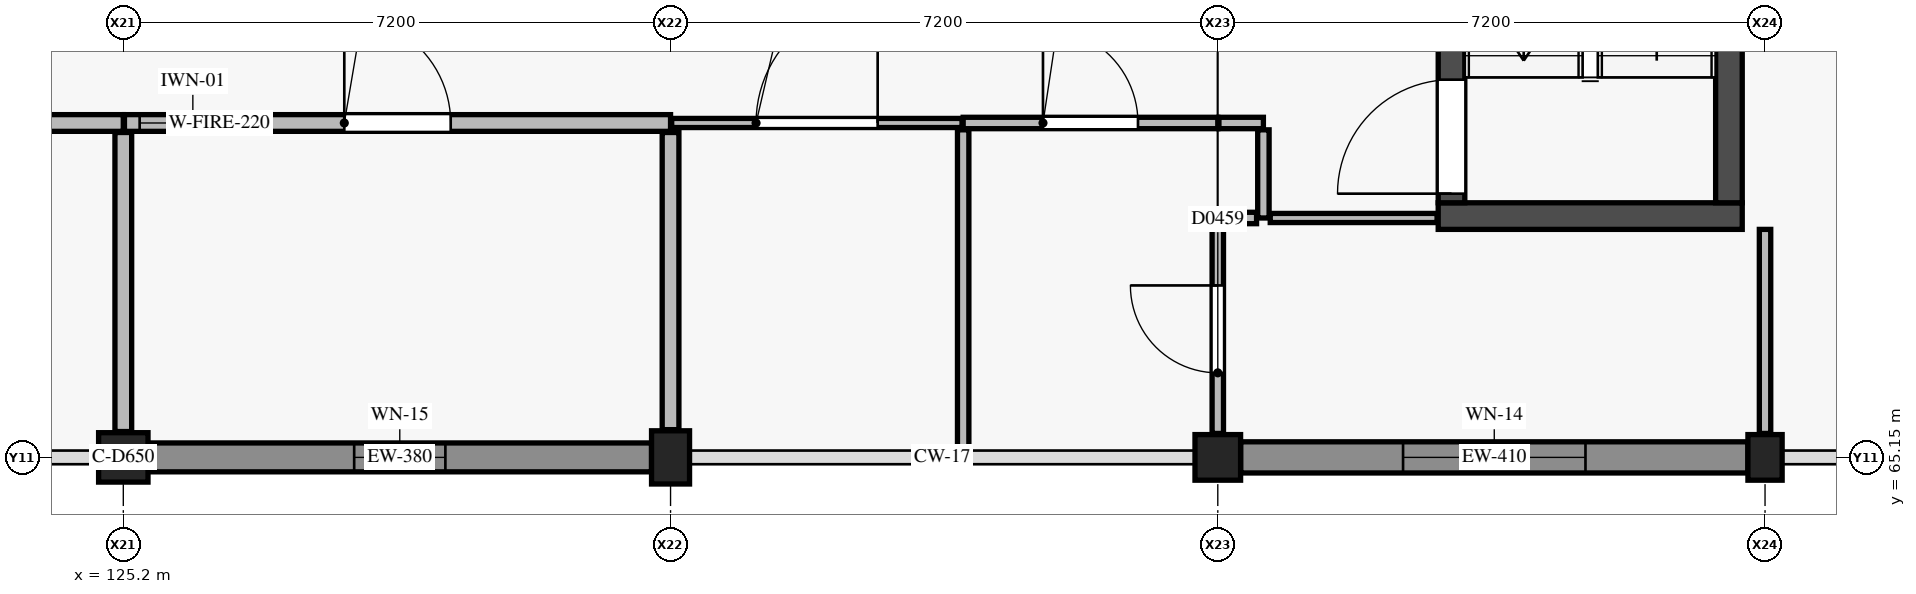
"""IFC4 building model, lengths in metres.
Left out: names, types, materials, properties, quantities, classifications, styles, units other than length and angle.
Written with IfcOpenShell. Run it as: python <this file> out.ifc"""

import sys

from ifc_helpers import new_model, si_unit, direction, frame, frame_2d, origin, origin_2d, place, context, subcontext, project, spatial, rectangle, circle, extrude, element, fill, save


model = new_model("IFC4")
c1 = context("Model", 3, precision=1e-05, world=origin(), true_north=direction((0.0, 1.0)))
c2 = subcontext(c1, "Body", "Model", "MODEL_VIEW")
j1 = project(units=[si_unit("LENGTHUNIT", "METRE"), si_unit("PLANEANGLEUNIT", "RADIAN")], contexts=[c1])
p1 = place(None, origin())
s1 = spatial("IfcSite", under=j1, at=p1, CompositionType="ELEMENT")
p2 = place(p1, origin())
s2 = spatial("IfcBuilding", under=s1, at=p2, CompositionType="ELEMENT")
p3 = place(p2, frame((0.0, 0.0, 9.0)))
s3 = spatial("IfcBuildingStorey", under=s2, at=p3, CompositionType="ELEMENT", Elevation=9.0)
p4 = place(p3, frame((125.2, 65.15, 0.0), z_axis=(0.0, 0.0, 1.0), x_axis=(1.0, 0.0, 0.0)))
e1 = element("IfcColumn", 1, at=p4, inside=s3, PredefinedType="COLUMN", context=c2, shape_type="SweptSolid", body=[
    extrude(circle(Radius=0.325, at=origin_2d()), origin(), (0.0, 0.0, 1.0), 4.2),
])
p5 = place(p3, frame((132.4, 65.15, 0.0), z_axis=(0.0, 0.0, 1.0), x_axis=(1.0, 0.0, 0.0)))
e2 = element("IfcColumn", 2, at=p5, inside=s3, PredefinedType="COLUMN", context=c2, shape_type="SweptSolid", body=[
    extrude(rectangle(XDim=0.5, YDim=0.7, at=origin_2d()), origin(), (0.0, 0.0, 1.0), 4.2),
])
p6 = place(p3, frame((139.6, 65.15, 0.0), z_axis=(0.0, 0.0, 1.0), x_axis=(1.0, 0.0, 0.0)))
e3 = element("IfcColumn", 3, at=p6, inside=s3, PredefinedType="COLUMN", context=c2, shape_type="SweptSolid", body=[
    extrude(rectangle(XDim=0.6, YDim=0.6, at=origin_2d()), origin(), (0.0, 0.0, 1.0), 4.2),
])
p7 = place(p3, frame((146.8, 65.15, 0.0), z_axis=(0.0, 0.0, 1.0), x_axis=(1.0, 0.0, 0.0)))
e4 = element("IfcColumn", 4, at=p7, inside=s3, PredefinedType="COLUMN", context=c2, shape_type="SweptSolid", body=[
    extrude(rectangle(XDim=0.45, YDim=0.6, at=origin_2d()), origin(), (0.0, 0.0, 1.0), 4.2),
])
p8 = place(p3, frame((142.5, 68.325, 0.0), z_axis=(0.0, 0.0, 1.0), x_axis=(1.0, 0.0, 0.0)))
e5 = element("IfcWall", 5, at=p8, inside=s3, PredefinedType="SHEAR", context=c2, shape_type="SweptSolid", body=[
    extrude(rectangle(XDim=4.0, YDim=0.35, at=frame_2d((2.0, 0.0))), origin(), (0.0, 0.0, 1.0), 3.95),
])
p9 = place(p3, frame((142.675, 68.5, 0.0), z_axis=(0.0, 0.0, 1.0), x_axis=(0.0, 1.0, 0.0)))
e6 = element("IfcWall", 6, at=p9, inside=s3, PredefinedType="SHEAR", context=c2, shape_type="SweptSolid", body=[
    extrude(rectangle(XDim=7.3, YDim=0.35, at=frame_2d((3.65, 0.0))), origin(), (0.0, 0.0, 1.0), 3.95),
])
p10 = place(p9, frame((0.12, 0.0, 0.0)))
e7 = element("IfcOpeningElement", 7, at=p10, cuts=e6, PredefinedType="OPENING", context=c2, shape_type="SweptSolid", body=[
    extrude(rectangle(XDim=1.5, YDim=2.15, at=frame_2d((0.75, 1.075))), frame((0.0, 0.185, 0.0), z_axis=(0.0, -1.0, 0.0), x_axis=(1.0, 0.0, 0.0)), (0.0, 0.0, 1.0), 0.37),
])
p11 = place(p3, frame((146.325, 68.5, 0.0), z_axis=(0.0, 0.0, 1.0), x_axis=(0.0, 1.0, 0.0)))
e8 = element("IfcWall", 8, at=p11, inside=s3, PredefinedType="SHEAR", context=c2, shape_type="SweptSolid", body=[
    extrude(rectangle(XDim=7.3, YDim=0.35, at=frame_2d((3.65, 0.0))), origin(), (0.0, 0.0, 1.0), 3.95),
])
p12 = place(p3, frame((146.575, 65.15, 0.0), z_axis=(0.0, 0.0, 1.0), x_axis=(-1.0, 0.0, 0.0)))
e9 = element("IfcWall", 9, at=p12, inside=s3, PredefinedType="USERDEFINED", context=c2, shape_type="SweptSolid", body=[
    extrude(rectangle(XDim=6.675, YDim=0.41, at=frame_2d((3.337, 0.0))), origin(), (0.0, 0.0, 1.0), 3.13),
])
p13 = place(p12, frame((2.137, 0.0, 0.9)))
e10 = element("IfcOpeningElement", 10, at=p13, cuts=e9, PredefinedType="OPENING", context=c2, shape_type="SweptSolid", body=[
    extrude(rectangle(XDim=2.4, YDim=1.5, at=frame_2d((1.2, 0.75))), frame((0.0, 0.215, 0.0), z_axis=(0.0, -1.0, 0.0), x_axis=(1.0, 0.0, 0.0)), (0.0, 0.0, 1.0), 0.43),
])
p14 = place(p3, frame((132.15, 65.15, 0.0), z_axis=(0.0, 0.0, 1.0), x_axis=(-1.0, 0.0, 0.0)))
e11 = element("IfcWall", 11, at=p14, inside=s3, PredefinedType="USERDEFINED", context=c2, shape_type="SweptSolid", body=[
    extrude(rectangle(XDim=6.625, YDim=0.38, at=frame_2d((3.312, 0.0))), origin(), (0.0, 0.0, 1.0), 3.13),
])
p15 = place(p14, frame((2.712, 0.0, 0.6)))
e12 = element("IfcOpeningElement", 12, at=p15, cuts=e11, PredefinedType="OPENING", context=c2, shape_type="SweptSolid", body=[
    extrude(rectangle(XDim=1.2, YDim=2.2, at=frame_2d((0.6, 1.1))), frame((0.0, 0.2, 0.0), z_axis=(0.0, -1.0, 0.0), x_axis=(1.0, 0.0, 0.0)), (0.0, 0.0, 1.0), 0.4),
])
p16 = place(p3, frame((120.525, 69.55, 0.0), z_axis=(0.0, 0.0, 1.0), x_axis=(1.0, 0.0, 0.0)))
e13 = element("IfcWall", 13, at=p16, inside=s3, PredefinedType="PARTITIONING", context=c2, shape_type="SweptSolid", body=[
    extrude(rectangle(XDim=4.675, YDim=0.22, at=frame_2d((2.337, 0.0))), origin(), (0.0, 0.0, 1.0), 3.285),
])
p17 = place(p3, frame((125.215, 69.55, 0.0), z_axis=(0.0, 0.0, 1.0), x_axis=(1.0, 0.0, 0.0)))
e14 = element("IfcWall", 14, at=p17, inside=s3, PredefinedType="PARTITIONING", context=c2, shape_type="SweptSolid", body=[
    extrude(rectangle(XDim=7.185, YDim=0.22, at=frame_2d((3.592, 0.0))), origin(), (0.0, 0.0, 1.0), 3.285),
])
p18 = place(p17, frame((2.893, 0.0, 0.0)))
e15 = element("IfcOpeningElement", 15, at=p18, cuts=e14, PredefinedType="OPENING", context=c2, shape_type="SweptSolid", body=[
    extrude(rectangle(XDim=1.4, YDim=2.2, at=frame_2d((0.7, 1.1))), frame((0.0, 0.12, 0.0), z_axis=(0.0, -1.0, 0.0), x_axis=(1.0, 0.0, 0.0)), (0.0, 0.0, 1.0), 0.24),
])
p19 = place(p17, frame((0.2, 0.0, 1.05)))
e16 = element("IfcOpeningElement", 16, at=p19, cuts=e14, PredefinedType="OPENING", context=c2, shape_type="SweptSolid", body=[
    extrude(rectangle(XDim=1.4, YDim=1.1, at=frame_2d((0.7, 0.55))), frame((0.0, 0.12, 0.0), z_axis=(0.0, -1.0, 0.0), x_axis=(1.0, 0.0, 0.0)), (0.0, 0.0, 1.0), 0.24),
])
p20 = place(p3, frame((136.25, 69.55, 0.0), z_axis=(0.0, 0.0, 1.0), x_axis=(1.0, 0.0, 0.0)))
e17 = element("IfcWall", 17, at=p20, inside=s3, PredefinedType="PARTITIONING", context=c2, shape_type="SweptSolid", body=[
    extrude(rectangle(XDim=3.35, YDim=0.15, at=frame_2d((1.675, 0.0))), origin(), (0.0, 0.0, 1.0), 3.285),
])
p21 = place(p20, frame((1.05, 0.0, 0.0)))
e18 = element("IfcOpeningElement", 18, at=p21, cuts=e17, PredefinedType="OPENING", context=c2, shape_type="SweptSolid", body=[
    extrude(rectangle(XDim=1.25, YDim=2.15, at=frame_2d((0.625, 1.075))), frame((0.0, 0.085, 0.0), z_axis=(0.0, -1.0, 0.0), x_axis=(1.0, 0.0, 0.0)), (0.0, 0.0, 1.0), 0.17),
])
p22 = place(p3, frame((139.615, 69.55, 0.0), z_axis=(0.0, 0.0, 1.0), x_axis=(1.0, 0.0, 0.0)))
e19 = element("IfcWall", 19, at=p22, inside=s3, PredefinedType="PARTITIONING", context=c2, shape_type="SweptSolid", body=[
    extrude(rectangle(XDim=0.585, YDim=0.15, at=frame_2d((0.292, 0.0))), origin(), (0.0, 0.0, 1.0), 3.285),
])
p23 = place(p3, frame((140.2, 68.3, 0.0), z_axis=(0.0, 0.0, 1.0), x_axis=(0.0, 1.0, 0.0)))
e20 = element("IfcWall", 20, at=p23, inside=s3, PredefinedType="PARTITIONING", context=c2, shape_type="SweptSolid", body=[
    extrude(rectangle(XDim=1.16, YDim=0.15, at=frame_2d((0.58, 0.0))), origin(), (0.0, 0.0, 1.0), 3.95),
])
p24 = place(p3, frame((139.6, 68.3, 0.0), z_axis=(0.0, 0.0, 1.0), x_axis=(1.0, 0.0, 0.0)))
e21 = element("IfcWall", 21, at=p24, inside=s3, PredefinedType="PARTITIONING", context=c2, shape_type="SweptSolid", body=[
    extrude(rectangle(XDim=0.51, YDim=0.15, at=frame_2d((0.255, 0.0))), origin(), (0.0, 0.0, 1.0), 3.285),
])
p25 = place(p3, frame((132.415, 69.55, 0.0), z_axis=(0.0, 0.0, 1.0), x_axis=(1.0, 0.0, 0.0)))
e22 = element("IfcWall", 22, at=p25, inside=s3, PredefinedType="PARTITIONING", context=c2, shape_type="SweptSolid", body=[
    extrude(rectangle(XDim=3.82, YDim=0.12, at=frame_2d((1.91, 0.0))), origin(), (0.0, 0.0, 1.0), 3.455),
])
p26 = place(p25, frame((1.11, 0.0, 0.0)))
e23 = element("IfcOpeningElement", 23, at=p26, cuts=e22, PredefinedType="OPENING", context=c2, shape_type="SweptSolid", body=[
    extrude(rectangle(XDim=1.6, YDim=2.25, at=frame_2d((0.8, 1.125))), frame((0.0, 0.07, 0.0), z_axis=(0.0, -1.0, 0.0), x_axis=(1.0, 0.0, 0.0)), (0.0, 0.0, 1.0), 0.14),
])
p27 = place(p3, frame((140.29, 68.3, 0.0), z_axis=(0.0, 0.0, 1.0), x_axis=(1.0, 0.0, 0.0)))
e24 = element("IfcWall", 24, at=p27, inside=s3, PredefinedType="PARTITIONING", context=c2, shape_type="SweptSolid", body=[
    extrude(rectangle(XDim=2.195, YDim=0.12, at=frame_2d((1.098, 0.0))), origin(), (0.0, 0.0, 1.0), 3.95),
])
p28 = place(p3, frame((125.2, 65.49, 0.0), z_axis=(0.0, 0.0, 1.0), x_axis=(0.0, 1.0, 0.0)))
e25 = element("IfcWall", 25, at=p28, inside=s3, PredefinedType="PARTITIONING", context=c2, shape_type="SweptSolid", body=[
    extrude(rectangle(XDim=3.935, YDim=0.22, at=frame_2d((1.968, 0.0))), origin(), (0.0, 0.0, 1.0), 3.285),
])
p29 = place(p3, frame((132.4, 65.515, 0.0), z_axis=(0.0, 0.0, 1.0), x_axis=(0.0, 1.0, 0.0)))
e26 = element("IfcWall", 26, at=p29, inside=s3, PredefinedType="PARTITIONING", context=c2, shape_type="SweptSolid", body=[
    extrude(rectangle(XDim=3.91, YDim=0.22, at=frame_2d((1.955, 0.0))), origin(), (0.0, 0.0, 1.0), 3.455),
])
p30 = place(p3, frame((136.25, 65.255, 0.0), z_axis=(0.0, 0.0, 1.0), x_axis=(0.0, 1.0, 0.0)))
e27 = element("IfcWall", 27, at=p30, inside=s3, PredefinedType="PARTITIONING", context=c2, shape_type="SweptSolid", body=[
    extrude(rectangle(XDim=4.205, YDim=0.15, at=frame_2d((2.103, 0.0))), origin(), (0.0, 0.0, 1.0), 3.475),
])
p31 = place(p3, frame((139.6, 65.465, 0.0), z_axis=(0.0, 0.0, 1.0), x_axis=(0.0, 1.0, 0.0)))
e28 = element("IfcWall", 28, at=p31, inside=s3, PredefinedType="PARTITIONING", context=c2, shape_type="SweptSolid", body=[
    extrude(rectangle(XDim=2.745, YDim=0.15, at=frame_2d((1.373, 0.0))), origin(), (0.0, 0.0, 1.0), 3.285),
])
p32 = place(p31, frame((0.798, 0.0, 0.0)))
e29 = element("IfcOpeningElement", 29, at=p32, cuts=e28, PredefinedType="OPENING", context=c2, shape_type="SweptSolid", body=[
    extrude(rectangle(XDim=1.15, YDim=2.15, at=frame_2d((0.575, 1.075))), frame((0.0, 0.085, 0.0), z_axis=(0.0, -1.0, 0.0), x_axis=(1.0, 0.0, 0.0)), (0.0, 0.0, 1.0), 0.17),
])
p33 = place(p3, frame((146.8, 65.465, 0.0), z_axis=(0.0, 0.0, 1.0), x_axis=(0.0, 1.0, 0.0)))
e30 = element("IfcWall", 30, at=p33, inside=s3, PredefinedType="PARTITIONING", context=c2, shape_type="SweptSolid", body=[
    extrude(rectangle(XDim=2.685, YDim=0.15, at=frame_2d((1.342, 0.0))), origin(), (0.0, 0.0, 1.0), 3.215),
])
p34 = place(p13, origin())
e31 = element("IfcWindow", 31, at=p34, inside=s3, PartitioningType="SINGLE_PANEL", PredefinedType="WINDOW", context=c2, shape_type="SweptSolid", body=[
    extrude(rectangle(XDim=2.4, YDim=1.5, at=frame_2d((1.2, 0.75))), frame((0.0, 0.03, 0.0), z_axis=(0.0, -1.0, 0.0), x_axis=(1.0, 0.0, 0.0)), (0.0, 0.0, 1.0), 0.06),
])
fill(e10, e31)
p35 = place(p15, origin())
e32 = element("IfcWindow", 32, at=p35, inside=s3, PartitioningType="SINGLE_PANEL", PredefinedType="WINDOW", context=c2, shape_type="SweptSolid", body=[
    extrude(rectangle(XDim=1.2, YDim=2.2, at=frame_2d((0.6, 1.1))), frame((0.0, 0.03, 0.0), z_axis=(0.0, -1.0, 0.0), x_axis=(1.0, 0.0, 0.0)), (0.0, 0.0, 1.0), 0.06),
])
fill(e12, e32)
p36 = place(p10, origin())
e33 = element("IfcDoor", 33, at=p36, inside=s3, OperationType="SINGLE_SWING_LEFT", PredefinedType="DOOR", context=c2, shape_type="SweptSolid", body=[
    extrude(rectangle(XDim=1.5, YDim=2.15, at=frame_2d((0.75, 1.075))), frame((0.0, 0.025, 0.0), z_axis=(0.0, -1.0, 0.0), x_axis=(1.0, 0.0, 0.0)), (0.0, 0.0, 1.0), 0.05),
])
fill(e7, e33)
p37 = place(p18, origin())
e34 = element("IfcDoor", 34, at=p37, inside=s3, OperationType="SINGLE_SWING_LEFT", PredefinedType="DOOR", context=c2, shape_type="SweptSolid", body=[
    extrude(rectangle(XDim=1.4, YDim=2.2, at=frame_2d((0.7, 1.1))), frame((0.0, 0.025, 0.0), z_axis=(0.0, -1.0, 0.0), x_axis=(1.0, 0.0, 0.0)), (0.0, 0.0, 1.0), 0.05),
])
fill(e15, e34)
p38 = place(p19, origin())
e35 = element("IfcWindow", 35, at=p38, inside=s3, PartitioningType="SINGLE_PANEL", PredefinedType="WINDOW", context=c2, shape_type="SweptSolid", body=[
    extrude(rectangle(XDim=1.4, YDim=1.1, at=frame_2d((0.7, 0.55))), frame((0.0, 0.03, 0.0), z_axis=(0.0, -1.0, 0.0), x_axis=(1.0, 0.0, 0.0)), (0.0, 0.0, 1.0), 0.06),
])
fill(e16, e35)
p39 = place(p26, origin())
e36 = element("IfcDoor", 36, at=p39, inside=s3, OperationType="SINGLE_SWING_RIGHT", PredefinedType="DOOR", context=c2, shape_type="SweptSolid", body=[
    extrude(rectangle(XDim=1.6, YDim=2.25, at=frame_2d((0.8, 1.125))), frame((0.0, 0.025, 0.0), z_axis=(0.0, -1.0, 0.0), x_axis=(1.0, 0.0, 0.0)), (0.0, 0.0, 1.0), 0.05),
])
fill(e23, e36)
p40 = place(p21, origin())
e37 = element("IfcDoor", 37, at=p40, inside=s3, OperationType="SINGLE_SWING_LEFT", PredefinedType="DOOR", context=c2, shape_type="SweptSolid", body=[
    extrude(rectangle(XDim=1.25, YDim=2.15, at=frame_2d((0.625, 1.075))), frame((0.0, 0.025, 0.0), z_axis=(0.0, -1.0, 0.0), x_axis=(1.0, 0.0, 0.0)), (0.0, 0.0, 1.0), 0.05),
])
fill(e18, e37)
p41 = place(p32, origin())
e38 = element("IfcDoor", 38, at=p41, inside=s3, OperationType="SINGLE_SWING_RIGHT", PredefinedType="DOOR", context=c2, shape_type="SweptSolid", body=[
    extrude(rectangle(XDim=1.15, YDim=2.15, at=frame_2d((0.575, 1.075))), frame((0.0, 0.025, 0.0), z_axis=(0.0, -1.0, 0.0), x_axis=(1.0, 0.0, 0.0)), (0.0, 0.0, 1.0), 0.05),
])
fill(e29, e38)
save(model, sys.argv[1])
